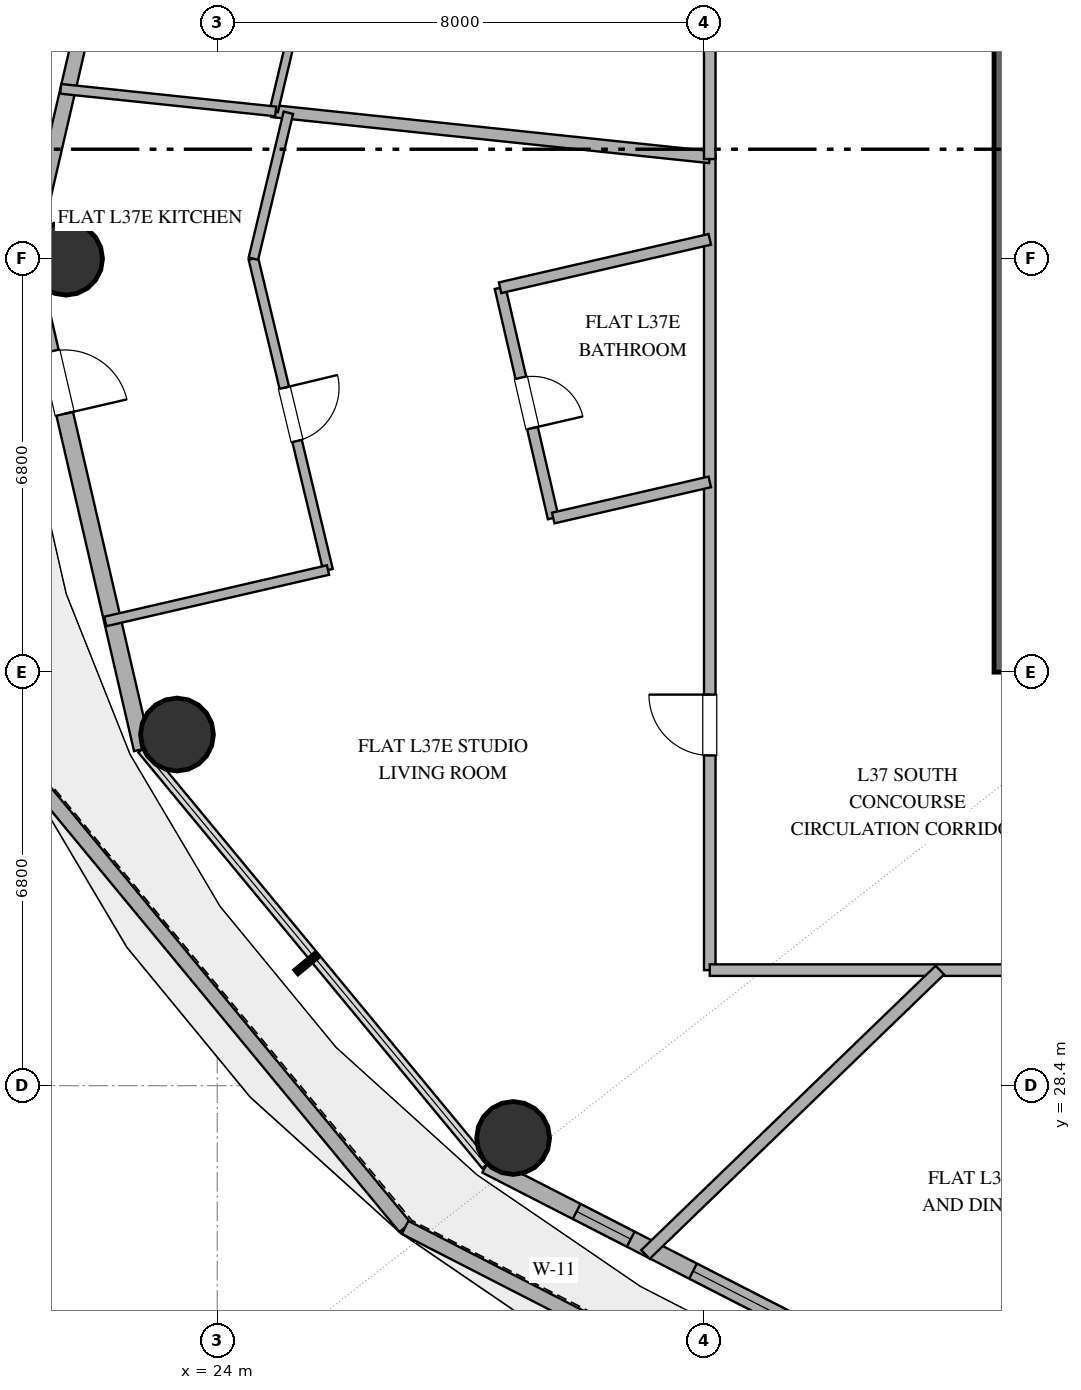
"""IFC4 building model, lengths in metres.
Left out: names, types, materials, properties, quantities, classifications, styles, units other than length and angle.
Written with IfcOpenShell. Run it as: python <this file> out.ifc"""

import sys

from ifc_helpers import new_model, si_unit, direction, frame, frame_2d, origin, origin_2d, place, context, subcontext, project, spatial, rectangle, hollow_circle, extrude, element, fill, save


model = new_model("IFC4")
c1 = context("Model", 3, precision=1e-05, world=origin(), true_north=direction((0.0, 1.0)))
c2 = subcontext(c1, "Body", "Model", "MODEL_VIEW")
j1 = project(units=[si_unit("LENGTHUNIT", "METRE"), si_unit("PLANEANGLEUNIT", "RADIAN")], contexts=[c1])
p1 = place(None, origin())
s1 = spatial("IfcSite", under=j1, at=p1, CompositionType="ELEMENT")
p2 = place(p1, origin())
s2 = spatial("IfcBuilding", under=s1, at=p2, CompositionType="ELEMENT")
p3 = place(p2, frame((0.0, 0.0, 150.6)))
s3 = spatial("IfcBuildingStorey", under=s2, at=p3, CompositionType="ELEMENT", Elevation=150.6)
p4 = place(p3, frame((37.0, 35.2, 0.0), z_axis=(0.0, 0.0, 1.0), x_axis=(0.0, 1.0, 0.0)))
e1 = element("IfcWall", 1, at=p4, inside=s3, PredefinedType="SHEAR", context=c2, shape_type="SweptSolid", body=[
    extrude(rectangle(XDim=13.6, YDim=0.45, at=frame_2d((6.8, 0.0))), origin(), (0.0, 0.0, 1.0), 3.38),
])
for number, where, z_axis, x_axis in (
    (2, (21.513, 42.0, 0.0), (0.0, 0.0, 1.0), (1.0, 0.0, 0.0)),
    (3, (23.338, 34.174, 0.0), (0.0, 0.0, 1.0), (1.0, 0.0, 0.0)),
    (4, (28.866, 27.54, 0.0), (0.0, 0.0, 1.0), (1.0, 0.0, 0.0)),
):
    element("IfcColumn", number, at=place(p3, frame(where, z_axis=z_axis, x_axis=x_axis)), inside=s3, PredefinedType="COLUMN", context=c2, shape_type="SweptSolid", body=[
        extrude(hollow_circle(Radius=0.6, WallThickness=0.032, at=origin_2d()), origin(), (0.0, 0.0, 1.0), 3.38),
    ])
p5 = place(p3, frame((21.048, 33.378, 0.0), z_axis=(0.0, 0.0, 1.0), x_axis=(0.637107627078, -0.770774851379, 0.0)))
e5 = element("IfcWall", 5, at=p5, inside=s3, PredefinedType="PARAPET", context=c2, shape_type="SweptSolid", body=[
    extrude(rectangle(XDim=9.483, YDim=0.24, at=frame_2d((4.742, 0.0))), origin(), (0.0, 0.0, 1.0), 1.25),
])
p6 = place(p3, frame((27.09, 26.069, 0.0), z_axis=(0.0, 0.0, 1.0), x_axis=(0.8897661473, -0.456416698992, 0.0)))
e6 = element("IfcWall", 6, at=p6, inside=s3, PredefinedType="PARAPET", context=c2, shape_type="SweptSolid", body=[
    extrude(rectangle(XDim=10.7, YDim=0.24, at=frame_2d((5.35, 0.0))), origin(), (0.0, 0.0, 1.0), 1.25),
])
p7 = place(p3, frame((22.768, 50.067, 0.0), z_axis=(0.0, 0.0, 1.0), x_axis=(-0.225473184558, -0.974249374157, 0.0)))
e7 = element("IfcWall", 7, at=p7, inside=s3, PredefinedType="SOLIDWALL", context=c2, shape_type="SweptSolid", body=[
    extrude(rectangle(XDim=8.28, YDim=0.25, at=frame_2d((4.14, 0.0))), origin(), (0.0, 0.0, 1.0), 3.38),
])
p8 = place(p7, frame((2.447, 0.0, 0.35)))
e8 = element("IfcOpeningElement", 8, at=p8, cuts=e7, PredefinedType="OPENING", context=c2, shape_type="SweptSolid", body=[
    extrude(rectangle(XDim=1.0, YDim=1.05, at=frame_2d((0.5, 0.525))), frame((0.0, 0.135, 0.0), z_axis=(0.0, -1.0, 0.0), x_axis=(1.0, 0.0, 0.0)), (0.0, 0.0, 1.0), 0.27),
])
p9 = place(p3, frame((20.901, 42.0, 0.0), z_axis=(0.0, 0.0, 1.0), x_axis=(0.225473184558, -0.974249374157, 0.0)))
e9 = element("IfcWall", 9, at=p9, inside=s3, PredefinedType="SOLIDWALL", context=c2, shape_type="SweptSolid", body=[
    extrude(rectangle(XDim=8.28, YDim=0.28, at=frame_2d((4.14, 0.0))), origin(), (0.0, 0.0, 1.0), 3.38),
])
p10 = place(p9, frame((1.568, 0.0, 0.0)))
e10 = element("IfcOpeningElement", 10, at=p10, cuts=e9, PredefinedType="OPENING", context=c2, shape_type="SweptSolid", body=[
    extrude(rectangle(XDim=1.05, YDim=2.2, at=frame_2d((0.525, 1.1))), frame((0.0, 0.15, 0.0), z_axis=(0.0, -1.0, 0.0), x_axis=(1.0, 0.0, 0.0)), (0.0, 0.0, 1.0), 0.3),
])
p11 = place(p3, frame((28.424, 27.094, 0.0), z_axis=(0.0, 0.0, 1.0), x_axis=(0.889872523182, -0.456209263919, 0.0)))
e11 = element("IfcWall", 11, at=p11, inside=s3, PredefinedType="SOLIDWALL", context=c2, shape_type="SweptSolid", body=[
    extrude(rectangle(XDim=10.016, YDim=0.28, at=frame_2d((5.008, 0.0))), origin(), (0.0, 0.0, 1.0), 3.38),
])
p12 = place(p11, frame((1.67, 0.0, 0.85)))
e12 = element("IfcOpeningElement", 12, at=p12, cuts=e11, PredefinedType="OPENING", context=c2, shape_type="SweptSolid", body=[
    extrude(rectangle(XDim=1.0, YDim=1.8, at=frame_2d((0.5, 0.9))), frame((0.0, 0.15, 0.0), z_axis=(0.0, -1.0, 0.0), x_axis=(1.0, 0.0, 0.0)), (0.0, 0.0, 1.0), 0.3),
])
p13 = place(p11, frame((3.822, 0.0, 0.85)))
e13 = element("IfcOpeningElement", 13, at=p13, cuts=e11, PredefinedType="OPENING", context=c2, shape_type="SweptSolid", body=[
    extrude(rectangle(XDim=1.8, YDim=2.2, at=frame_2d((0.9, 1.1))), frame((0.0, 0.15, 0.0), z_axis=(0.0, -1.0, 0.0), x_axis=(1.0, 0.0, 0.0)), (0.0, 0.0, 1.0), 0.3),
])
p14 = place(p11, frame((6.194, 0.0, 0.85)))
e14 = element("IfcOpeningElement", 14, at=p14, cuts=e11, PredefinedType="OPENING", context=c2, shape_type="SweptSolid", body=[
    extrude(rectangle(XDim=1.8, YDim=2.2, at=frame_2d((0.9, 1.1))), frame((0.0, 0.15, 0.0), z_axis=(0.0, -1.0, 0.0), x_axis=(1.0, 0.0, 0.0)), (0.0, 0.0, 1.0), 0.3),
])
p15 = place(p3, frame((32.1, 30.3, 0.0), z_axis=(0.0, 0.0, 1.0), x_axis=(0.0, 1.0, 0.0)))
e15 = element("IfcWall", 15, at=p15, inside=s3, PredefinedType="PARTITIONING", context=c2, shape_type="SweptSolid", body=[
    extrude(rectangle(XDim=13.403, YDim=0.19, at=frame_2d((6.702, 0.0))), origin(), (0.0, 0.0, 1.0), 2.74),
])
p16 = place(p15, frame((3.531, 0.0, 0.0)))
e16 = element("IfcOpeningElement", 16, at=p16, cuts=e15, PredefinedType="OPENING", context=c2, shape_type="SweptSolid", body=[
    extrude(rectangle(XDim=1.0, YDim=2.2, at=frame_2d((0.5, 1.1))), frame((0.0, 0.105, 0.0), z_axis=(0.0, -1.0, 0.0), x_axis=(1.0, 0.0, 0.0)), (0.0, 0.0, 1.0), 0.21),
])
p17 = place(p3, frame((32.1, 43.671, 0.0), z_axis=(0.0, 0.0, 1.0), x_axis=(-0.994522615629, 0.104521610217, 0.0)))
e17 = element("IfcWall", 17, at=p17, inside=s3, PredefinedType="PARTITIONING", context=c2, shape_type="SweptSolid", body=[
    extrude(rectangle(XDim=7.243, YDim=0.2, at=frame_2d((3.622, 0.0))), origin(), (0.0, 0.0, 1.0), 2.74),
])
p18 = place(p3, frame((32.1, 30.3, 0.0), z_axis=(0.0, 0.0, 1.0), x_axis=(1.0, 0.0, 0.0)))
e18 = element("IfcWall", 18, at=p18, inside=s3, PredefinedType="PARTITIONING", context=c2, shape_type="SweptSolid", body=[
    extrude(rectangle(XDim=15.491, YDim=0.19, at=frame_2d((7.746, 0.0))), origin(), (0.0, 0.0, 1.0), 2.74),
])
p19 = place(p18, frame((6.738, 0.0, 0.0)))
e19 = element("IfcOpeningElement", 19, at=p19, cuts=e18, PredefinedType="OPENING", context=c2, shape_type="SweptSolid", body=[
    extrude(rectangle(XDim=1.0, YDim=2.2, at=frame_2d((0.5, 1.1))), frame((0.0, 0.105, 0.0), z_axis=(0.0, -1.0, 0.0), x_axis=(1.0, 0.0, 0.0)), (0.0, 0.0, 1.0), 0.21),
])
p20 = place(p3, frame((31.042, 25.624, 0.0), z_axis=(0.0, 0.0, 1.0), x_axis=(0.719330837604, 0.694667651522, 0.0)))
e20 = element("IfcWall", 20, at=p20, inside=s3, PredefinedType="PARTITIONING", context=c2, shape_type="SweptSolid", body=[
    extrude(rectangle(XDim=6.731, YDim=0.2, at=frame_2d((3.366, 0.0))), origin(), (0.0, 0.0, 1.0), 2.74),
])
p21 = place(p3, frame((32.1, 43.639, 0.0), z_axis=(0.0, 0.0, 1.0), x_axis=(0.0, 1.0, 0.0)))
e21 = element("IfcWall", 21, at=p21, inside=s3, PredefinedType="PARTITIONING", context=c2, shape_type="SweptSolid", body=[
    extrude(rectangle(XDim=10.061, YDim=0.19, at=frame_2d((5.031, 0.0))), origin(), (0.0, 0.0, 1.0), 2.74),
])
p22 = place(p3, frame((24.594, 42.0, 0.0), z_axis=(0.0, 0.0, 1.0), x_axis=(0.233087094169, -0.972455863539, 0.0)))
e22 = element("IfcWall", 22, at=p22, inside=s3, PredefinedType="PLUMBINGWALL", context=c2, shape_type="SweptSolid", body=[
    extrude(rectangle(XDim=5.265, YDim=0.16, at=frame_2d((2.633, 0.0))), origin(), (0.0, 0.0, 1.0), 2.74),
])
p23 = place(p22, frame((2.183, 0.0, 0.0)))
e23 = element("IfcOpeningElement", 23, at=p23, cuts=e22, PredefinedType="OPENING", context=c2, shape_type="SweptSolid", body=[
    extrude(rectangle(XDim=0.9, YDim=2.1, at=frame_2d((0.45, 1.05))), frame((0.0, 0.09, 0.0), z_axis=(0.0, -1.0, 0.0), x_axis=(1.0, 0.0, 0.0)), (0.0, 0.0, 1.0), 0.18),
])
p24 = place(p3, frame((24.929, 44.425, 0.0), z_axis=(0.0, 0.0, 1.0), x_axis=(0.23166656053, 0.972795253243, 0.0)))
e24 = element("IfcWall", 24, at=p24, inside=s3, PredefinedType="PARTITIONING", context=c2, shape_type="SweptSolid", body=[
    extrude(rectangle(XDim=4.541, YDim=0.14, at=frame_2d((2.271, 0.0))), origin(), (0.0, 0.0, 1.0), 2.74),
])
p25 = place(p24, frame((1.821, 0.0, 0.0)))
e25 = element("IfcOpeningElement", 25, at=p25, cuts=e24, PredefinedType="OPENING", context=c2, shape_type="SweptSolid", body=[
    extrude(rectangle(XDim=0.9, YDim=2.1, at=frame_2d((0.45, 1.05))), frame((0.0, 0.08, 0.0), z_axis=(0.0, -1.0, 0.0), x_axis=(1.0, 0.0, 0.0)), (0.0, 0.0, 1.0), 0.16),
])
p26 = place(p3, frame((28.652, 41.522, 0.0), z_axis=(0.0, 0.0, 1.0), x_axis=(0.224891621851, -0.974383783948, 0.0)))
e26 = element("IfcWall", 26, at=p26, inside=s3, PredefinedType="PLUMBINGWALL", context=c2, shape_type="SweptSolid", body=[
    extrude(rectangle(XDim=3.886, YDim=0.18, at=frame_2d((1.943, 0.0))), origin(), (0.0, 0.0, 1.0), 2.74),
])
p27 = place(p26, frame((1.518, 0.0, 0.0)))
e27 = element("IfcOpeningElement", 27, at=p27, cuts=e26, PredefinedType="OPENING", context=c2, shape_type="SweptSolid", body=[
    extrude(rectangle(XDim=0.85, YDim=2.1, at=frame_2d((0.425, 1.05))), frame((0.0, 0.1, 0.0), z_axis=(0.0, -1.0, 0.0), x_axis=(1.0, 0.0, 0.0)), (0.0, 0.0, 1.0), 0.2),
])
p28 = place(p3, frame((25.822, 36.88, 0.0), z_axis=(0.0, 0.0, 1.0), x_axis=(-0.97437258695, -0.22494012937, 0.0)))
e28 = element("IfcWall", 28, at=p28, inside=s3, PredefinedType="PLUMBINGWALL", context=c2, shape_type="SweptSolid", body=[
    extrude(rectangle(XDim=3.76, YDim=0.16, at=frame_2d((1.88, 0.0))), origin(), (0.0, 0.0, 1.0), 2.74),
])
p29 = place(p3, frame((21.425, 44.793, 0.0), z_axis=(0.0, 0.0, 1.0), x_axis=(0.994516359121, -0.104581123727, 0.0)))
e29 = element("IfcWall", 29, at=p29, inside=s3, PredefinedType="PLUMBINGWALL", context=c2, shape_type="SweptSolid", body=[
    extrude(rectangle(XDim=3.555, YDim=0.16, at=frame_2d((1.778, 0.0))), origin(), (0.0, 0.0, 1.0), 2.74),
])
p30 = place(p3, frame((32.1, 42.318, 0.0), z_axis=(0.0, 0.0, 1.0), x_axis=(-0.974370264362, -0.224950189882, 0.0)))
e30 = element("IfcWall", 30, at=p30, inside=s3, PredefinedType="PLUMBINGWALL", context=c2, shape_type="SweptSolid", body=[
    extrude(rectangle(XDim=3.539, YDim=0.18, at=frame_2d((1.77, 0.0))), origin(), (0.0, 0.0, 1.0), 2.74),
])
p31 = place(p3, frame((29.526, 37.735, 0.0), z_axis=(0.0, 0.0, 1.0), x_axis=(0.974380293177, 0.224906745718, 0.0)))
e31 = element("IfcWall", 31, at=p31, inside=s3, PredefinedType="PLUMBINGWALL", context=c2, shape_type="SweptSolid", body=[
    extrude(rectangle(XDim=2.642, YDim=0.18, at=frame_2d((1.321, 0.0))), origin(), (0.0, 0.0, 1.0), 2.74),
])
p32 = place(p3, frame((25.169, 44.4, 0.0), z_axis=(0.0, 0.0, 1.0), x_axis=(-0.233096038601, -0.972453719613, 0.0)))
e32 = element("IfcWall", 32, at=p32, inside=s3, PredefinedType="PLUMBINGWALL", context=c2, shape_type="SweptSolid", body=[
    extrude(rectangle(XDim=2.468, YDim=0.16, at=frame_2d((1.234, 0.0))), origin(), (0.0, 0.0, 1.0), 2.74),
])
p33 = place(p10, origin())
e33 = element("IfcDoor", 33, at=p33, inside=s3, OperationType="SINGLE_SWING_RIGHT", PredefinedType="DOOR", context=c2, shape_type="SweptSolid", body=[
    extrude(rectangle(XDim=1.05, YDim=2.2, at=frame_2d((0.525, 1.1))), frame((0.0, 0.025, 0.0), z_axis=(0.0, -1.0, 0.0), x_axis=(1.0, 0.0, 0.0)), (0.0, 0.0, 1.0), 0.05),
])
fill(e10, e33)
p34 = place(p12, origin())
e34 = element("IfcWindow", 34, at=p34, inside=s3, PartitioningType="SINGLE_PANEL", PredefinedType="WINDOW", context=c2, shape_type="SweptSolid", body=[
    extrude(rectangle(XDim=1.0, YDim=1.8, at=frame_2d((0.5, 0.9))), frame((0.0, 0.03, 0.0), z_axis=(0.0, -1.0, 0.0), x_axis=(1.0, 0.0, 0.0)), (0.0, 0.0, 1.0), 0.06),
])
fill(e12, e34)
p35 = place(p13, origin())
e35 = element("IfcWindow", 35, at=p35, inside=s3, PartitioningType="SINGLE_PANEL", PredefinedType="WINDOW", context=c2, shape_type="SweptSolid", body=[
    extrude(rectangle(XDim=1.8, YDim=2.2, at=frame_2d((0.9, 1.1))), frame((0.0, 0.03, 0.0), z_axis=(0.0, -1.0, 0.0), x_axis=(1.0, 0.0, 0.0)), (0.0, 0.0, 1.0), 0.06),
])
fill(e13, e35)
p36 = place(p16, origin())
e36 = element("IfcDoor", 36, at=p36, inside=s3, OperationType="SINGLE_SWING_RIGHT", PredefinedType="DOOR", context=c2, shape_type="SweptSolid", body=[
    extrude(rectangle(XDim=1.0, YDim=2.2, at=frame_2d((0.5, 1.1))), frame((0.0, 0.025, 0.0), z_axis=(0.0, -1.0, 0.0), x_axis=(1.0, 0.0, 0.0)), (0.0, 0.0, 1.0), 0.05),
])
fill(e16, e36)
p37 = place(p23, origin())
e37 = element("IfcDoor", 37, at=p37, inside=s3, OperationType="SINGLE_SWING_LEFT", PredefinedType="DOOR", context=c2, shape_type="SweptSolid", body=[
    extrude(rectangle(XDim=0.9, YDim=2.1, at=frame_2d((0.45, 1.05))), frame((0.0, 0.025, 0.0), z_axis=(0.0, -1.0, 0.0), x_axis=(1.0, 0.0, 0.0)), (0.0, 0.0, 1.0), 0.05),
])
fill(e23, e37)
p38 = place(p27, origin())
e38 = element("IfcDoor", 38, at=p38, inside=s3, OperationType="SINGLE_SWING_RIGHT", PredefinedType="DOOR", context=c2, shape_type="SweptSolid", body=[
    extrude(rectangle(XDim=0.85, YDim=2.1, at=frame_2d((0.425, 1.05))), frame((0.0, 0.025, 0.0), z_axis=(0.0, -1.0, 0.0), x_axis=(1.0, 0.0, 0.0)), (0.0, 0.0, 1.0), 0.05),
])
fill(e27, e38)
save(model, sys.argv[1])
